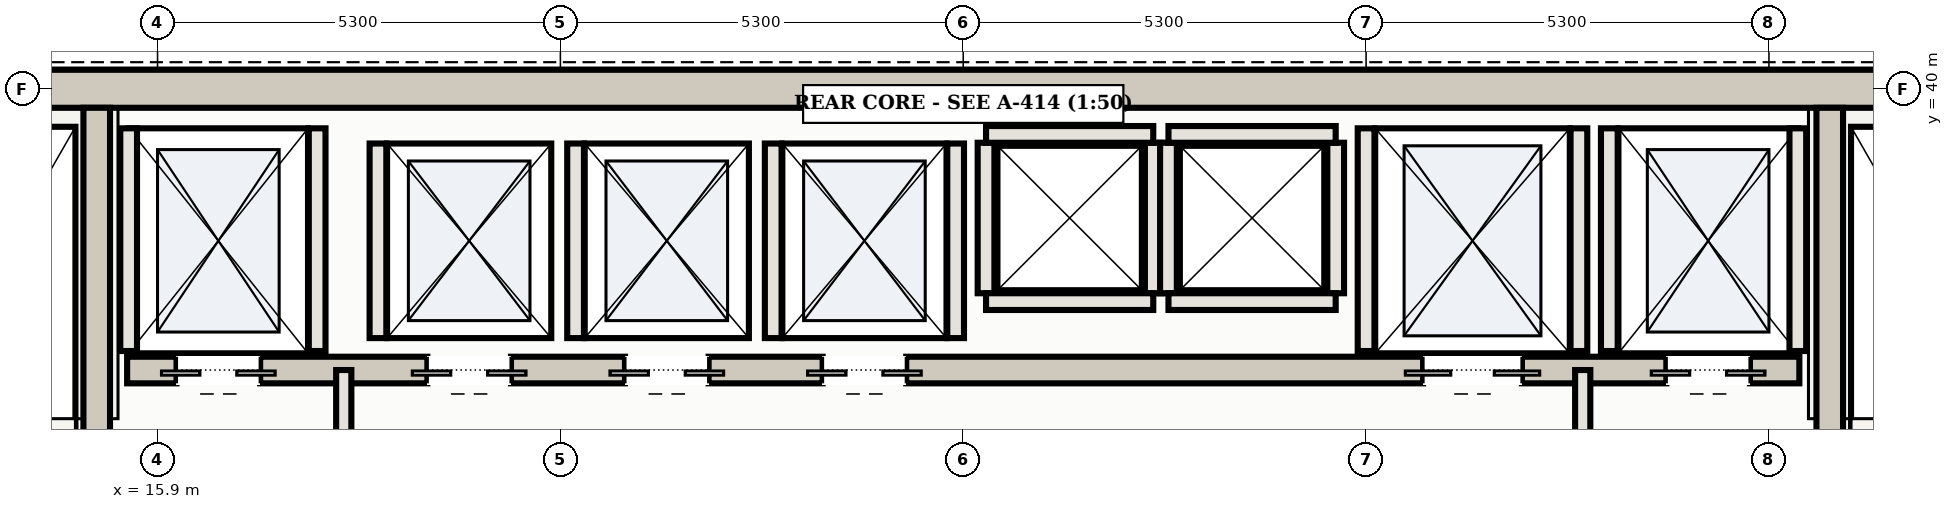
"""IFC4 building model, lengths in metres.
Left out: names, types, materials, properties, quantities, classifications, styles, units other than length and angle.
Written with IfcOpenShell. Run it as: python <this file> out.ifc"""

import sys

from ifc_helpers import new_model, si_unit, direction, frame, frame_2d, origin, place, context, subcontext, project, spatial, rectangle, extrude, element, fill, save


model = new_model("IFC4")
c1 = context("Model", 3, precision=1e-05, world=origin(), true_north=direction((0.0, 1.0)))
c2 = subcontext(c1, "Body", "Model", "MODEL_VIEW")
j1 = project(units=[si_unit("LENGTHUNIT", "METRE"), si_unit("PLANEANGLEUNIT", "RADIAN")], contexts=[c1])
p1 = place(None, origin())
s1 = spatial("IfcSite", under=j1, at=p1, CompositionType="ELEMENT")
p2 = place(p1, origin())
s2 = spatial("IfcBuilding", under=s1, at=p2, CompositionType="ELEMENT")
p3 = place(p2, frame((0.0, 0.0, 196.7)))
s3 = spatial("IfcBuildingStorey", under=s2, at=p3, CompositionType="ELEMENT", Elevation=196.7)
p4 = place(p3, frame((10.35, 40.0, 0.0), z_axis=(0.0, 0.0, 1.0), x_axis=(1.0, 0.0, 0.0)))
e1 = element("IfcWall", 1, at=p4, inside=s3, PredefinedType="SHEAR", context=c2, shape_type="SweptSolid", body=[
    extrude(rectangle(XDim=32.3, YDim=0.5, at=frame_2d((16.15, 0.0))), origin(), (0.0, 0.0, 1.0), 3.11),
])
p5 = place(p3, frame((15.1, 31.1, 0.0), z_axis=(0.0, 0.0, 1.0), x_axis=(0.0, 1.0, 0.0)))
e2 = element("IfcWall", 2, at=p5, inside=s3, PredefinedType="SHEAR", context=c2, shape_type="SweptSolid", body=[
    extrude(rectangle(XDim=8.65, YDim=0.35, at=frame_2d((4.325, 0.0))), origin(), (0.0, 0.0, 1.0), 3.11),
])
p6 = place(p5, frame((0.51, 0.0, 0.0)))
e3 = element("IfcOpeningElement", 3, at=p6, cuts=e2, PredefinedType="OPENING", context=c2, shape_type="SweptSolid", body=[
    extrude(rectangle(XDim=1.15, YDim=2.2, at=frame_2d((0.575, 1.1))), frame((0.0, 0.185, 0.0), z_axis=(0.0, -1.0, 0.0), x_axis=(1.0, 0.0, 0.0)), (0.0, 0.0, 1.0), 0.37),
])
p7 = place(p3, frame((37.9, 31.1, 0.0), z_axis=(0.0, 0.0, 1.0), x_axis=(0.0, 1.0, 0.0)))
e4 = element("IfcWall", 4, at=p7, inside=s3, PredefinedType="SHEAR", context=c2, shape_type="SweptSolid", body=[
    extrude(rectangle(XDim=8.65, YDim=0.35, at=frame_2d((4.325, 0.0))), origin(), (0.0, 0.0, 1.0), 3.11),
])
p8 = place(p7, frame((0.51, 0.0, 0.0)))
e5 = element("IfcOpeningElement", 5, at=p8, cuts=e4, PredefinedType="OPENING", context=c2, shape_type="SweptSolid", body=[
    extrude(rectangle(XDim=1.15, YDim=2.2, at=frame_2d((0.575, 1.1))), frame((0.0, 0.185, 0.0), z_axis=(0.0, -1.0, 0.0), x_axis=(1.0, 0.0, 0.0)), (0.0, 0.0, 1.0), 0.37),
])
p9 = place(p3, frame((15.5, 36.3, 0.0), z_axis=(0.0, 0.0, 1.0), x_axis=(1.0, 0.0, 0.0)))
e6 = element("IfcWall", 6, at=p9, inside=s3, PredefinedType="SHEAR", context=c2, shape_type="SweptSolid", body=[
    extrude(rectangle(XDim=22.0, YDim=0.35, at=frame_2d((11.0, 0.0))), origin(), (0.0, 0.0, 1.0), 3.11),
])
p10 = place(p9, frame((0.65, 0.0, 0.0)))
e7 = element("IfcOpeningElement", 7, at=p10, cuts=e6, PredefinedType="OPENING", context=c2, shape_type="SweptSolid", body=[
    extrude(rectangle(XDim=1.1, YDim=2.15, at=frame_2d((0.55, 1.075))), frame((0.0, 0.185, 0.0), z_axis=(0.0, -1.0, 0.0), x_axis=(1.0, 0.0, 0.0)), (0.0, 0.0, 1.0), 0.37),
])
p11 = place(p9, frame((20.25, 0.0, 0.0)))
e8 = element("IfcOpeningElement", 8, at=p11, cuts=e6, PredefinedType="OPENING", context=c2, shape_type="SweptSolid", body=[
    extrude(rectangle(XDim=1.1, YDim=2.15, at=frame_2d((0.55, 1.075))), frame((0.0, 0.185, 0.0), z_axis=(0.0, -1.0, 0.0), x_axis=(1.0, 0.0, 0.0)), (0.0, 0.0, 1.0), 0.37),
])
p12 = place(p9, frame((17.05, 0.0, 0.0)))
e9 = element("IfcOpeningElement", 9, at=p12, cuts=e6, PredefinedType="OPENING", context=c2, shape_type="SweptSolid", body=[
    extrude(rectangle(XDim=1.3, YDim=2.2, at=frame_2d((0.65, 1.1))), frame((0.0, 0.185, 0.0), z_axis=(0.0, -1.0, 0.0), x_axis=(1.0, 0.0, 0.0)), (0.0, 0.0, 1.0), 0.37),
])
p13 = place(p9, frame((3.95, 0.0, 0.0)))
e10 = element("IfcOpeningElement", 10, at=p13, cuts=e6, PredefinedType="OPENING", context=c2, shape_type="SweptSolid", body=[
    extrude(rectangle(XDim=1.1, YDim=2.15, at=frame_2d((0.55, 1.075))), frame((0.0, 0.185, 0.0), z_axis=(0.0, -1.0, 0.0), x_axis=(1.0, 0.0, 0.0)), (0.0, 0.0, 1.0), 0.37),
])
p14 = place(p9, frame((6.55, 0.0, 0.0)))
e11 = element("IfcOpeningElement", 11, at=p14, cuts=e6, PredefinedType="OPENING", context=c2, shape_type="SweptSolid", body=[
    extrude(rectangle(XDim=1.1, YDim=2.15, at=frame_2d((0.55, 1.075))), frame((0.0, 0.185, 0.0), z_axis=(0.0, -1.0, 0.0), x_axis=(1.0, 0.0, 0.0)), (0.0, 0.0, 1.0), 0.37),
])
p15 = place(p9, frame((9.15, 0.0, 0.0)))
e12 = element("IfcOpeningElement", 12, at=p15, cuts=e6, PredefinedType="OPENING", context=c2, shape_type="SweptSolid", body=[
    extrude(rectangle(XDim=1.1, YDim=2.15, at=frame_2d((0.55, 1.075))), frame((0.0, 0.185, 0.0), z_axis=(0.0, -1.0, 0.0), x_axis=(1.0, 0.0, 0.0)), (0.0, 0.0, 1.0), 0.37),
])
for number, where, z_axis, x_axis in (
    (13, (15.52, 36.55, 0.0), (0.0, 0.0, 1.0), (0.0, 1.0, 0.0)),
    (14, (18.0, 36.55, 0.0), (0.0, 0.0, 1.0), (0.0, 1.0, 0.0)),
    (15, (35.0, 36.55, 0.0), (0.0, 0.0, 1.0), (0.0, 1.0, 0.0)),
    (16, (37.48, 36.55, 0.0), (0.0, 0.0, 1.0), (0.0, 1.0, 0.0)),
    (17, (31.8, 36.55, 0.0), (0.0, 0.0, 1.0), (0.0, 1.0, 0.0)),
    (18, (34.6, 36.55, 0.0), (0.0, 0.0, 1.0), (0.0, 1.0, 0.0)),
):
    element("IfcWall", number, at=place(p3, frame(where, z_axis=z_axis, x_axis=x_axis)), inside=s3, PredefinedType="SOLIDWALL", context=c2, shape_type="SweptSolid", body=[
        extrude(rectangle(XDim=2.93, YDim=0.22, at=frame_2d((1.465, 0.0))), origin(), (0.0, 0.0, 1.0), 3.11),
    ])
for number, where, z_axis, x_axis in (
    (19, (18.8, 36.72, 0.0), (0.0, 0.0, 1.0), (0.0, 1.0, 0.0)),
    (20, (21.4, 36.72, 0.0), (0.0, 0.0, 1.0), (0.0, 1.0, 0.0)),
    (21, (24.0, 36.72, 0.0), (0.0, 0.0, 1.0), (0.0, 1.0, 0.0)),
    (22, (26.4, 36.72, 0.0), (0.0, 0.0, 1.0), (0.0, 1.0, 0.0)),
):
    element("IfcWall", number, at=place(p3, frame(where, z_axis=z_axis, x_axis=x_axis)), inside=s3, PredefinedType="SOLIDWALL", context=c2, shape_type="SweptSolid", body=[
        extrude(rectangle(XDim=2.56, YDim=0.22, at=frame_2d((1.28, 0.0))), origin(), (0.0, 0.0, 1.0), 3.11),
    ])
for number, where, z_axis, x_axis in (
    (23, (26.8, 37.31, 0.0), (0.0, 0.0, 1.0), (0.0, 1.0, 0.0)),
    (24, (29.0, 37.31, 0.0), (0.0, 0.0, 1.0), (0.0, 1.0, 0.0)),
):
    element("IfcWall", number, at=place(p3, frame(where, z_axis=z_axis, x_axis=x_axis)), inside=s3, PredefinedType="SOLIDWALL", context=c2, shape_type="SweptSolid", body=[
        extrude(rectangle(XDim=1.98, YDim=0.22, at=frame_2d((0.99, 0.0))), origin(), (0.0, 0.0, 1.0), 3.11),
    ])
for number, where, z_axis, x_axis in (
    (25, (26.8, 39.4, 0.0), (0.0, 0.0, 1.0), (1.0, 0.0, 0.0)),
    (26, (26.8, 37.2, 0.0), (0.0, 0.0, 1.0), (1.0, 0.0, 0.0)),
):
    element("IfcWall", number, at=place(p3, frame(where, z_axis=z_axis, x_axis=x_axis)), inside=s3, PredefinedType="SOLIDWALL", context=c2, shape_type="SweptSolid", body=[
        extrude(rectangle(XDim=2.2, YDim=0.22, at=frame_2d((1.1, 0.0))), origin(), (0.0, 0.0, 1.0), 3.11),
    ])
for number, where, z_axis, x_axis in (
    (27, (29.2, 37.31, 0.0), (0.0, 0.0, 1.0), (0.0, 1.0, 0.0)),
    (28, (31.4, 37.31, 0.0), (0.0, 0.0, 1.0), (0.0, 1.0, 0.0)),
):
    element("IfcWall", number, at=place(p3, frame(where, z_axis=z_axis, x_axis=x_axis)), inside=s3, PredefinedType="SOLIDWALL", context=c2, shape_type="SweptSolid", body=[
        extrude(rectangle(XDim=1.98, YDim=0.22, at=frame_2d((0.99, 0.0))), origin(), (0.0, 0.0, 1.0), 3.11),
    ])
for number, where, z_axis, x_axis in (
    (29, (29.2, 39.4, 0.0), (0.0, 0.0, 1.0), (1.0, 0.0, 0.0)),
    (30, (29.2, 37.2, 0.0), (0.0, 0.0, 1.0), (1.0, 0.0, 0.0)),
):
    element("IfcWall", number, at=place(p3, frame(where, z_axis=z_axis, x_axis=x_axis)), inside=s3, PredefinedType="SOLIDWALL", context=c2, shape_type="SweptSolid", body=[
        extrude(rectangle(XDim=2.2, YDim=0.22, at=frame_2d((1.1, 0.0))), origin(), (0.0, 0.0, 1.0), 3.11),
    ])
p16 = place(p3, frame((18.35, 31.15, 0.0), z_axis=(0.0, 0.0, 1.0), x_axis=(0.0, 1.0, 0.0)))
e31 = element("IfcWall", 31, at=p16, inside=s3, PredefinedType="PARTITIONING", context=c2, shape_type="SweptSolid", body=[
    extrude(rectangle(XDim=5.15, YDim=0.2, at=frame_2d((2.575, 0.0))), origin(), (0.0, 0.0, 1.0), 2.43),
])
p17 = place(p16, frame((1.875, 0.0, 0.0)))
e32 = element("IfcOpeningElement", 32, at=p17, cuts=e31, PredefinedType="OPENING", context=c2, shape_type="SweptSolid", body=[
    extrude(rectangle(XDim=1.25, YDim=2.2, at=frame_2d((0.625, 1.1))), frame((0.0, 0.11, 0.0), z_axis=(0.0, -1.0, 0.0), x_axis=(1.0, 0.0, 0.0)), (0.0, 0.0, 1.0), 0.22),
])
p18 = place(p3, frame((34.65, 31.15, 0.0), z_axis=(0.0, 0.0, 1.0), x_axis=(0.0, 1.0, 0.0)))
e33 = element("IfcWall", 33, at=p18, inside=s3, PredefinedType="PARTITIONING", context=c2, shape_type="SweptSolid", body=[
    extrude(rectangle(XDim=5.15, YDim=0.2, at=frame_2d((2.575, 0.0))), origin(), (0.0, 0.0, 1.0), 2.43),
])
p19 = place(p18, frame((1.875, 0.0, 0.0)))
e34 = element("IfcOpeningElement", 34, at=p19, cuts=e33, PredefinedType="OPENING", context=c2, shape_type="SweptSolid", body=[
    extrude(rectangle(XDim=1.25, YDim=2.2, at=frame_2d((0.625, 1.1))), frame((0.0, 0.11, 0.0), z_axis=(0.0, -1.0, 0.0), x_axis=(1.0, 0.0, 0.0)), (0.0, 0.0, 1.0), 0.22),
])
p20 = place(p10, frame((1.1, 0.0, 0.0), z_axis=(0.0, 0.0, 1.0), x_axis=(-1.0, 0.0, 0.0)))
e35 = element("IfcDoor", 35, at=p20, inside=s3, OperationType="DOUBLE_DOOR_SLIDING", PredefinedType="DOOR", context=c2, shape_type="SweptSolid", body=[
    extrude(rectangle(XDim=1.1, YDim=2.15, at=frame_2d((0.55, 1.075))), frame((0.0, 0.025, 0.0), z_axis=(0.0, -1.0, 0.0), x_axis=(1.0, 0.0, 0.0)), (0.0, 0.0, 1.0), 0.05),
])
fill(e7, e35)
p21 = place(p11, frame((1.1, 0.0, 0.0), z_axis=(0.0, 0.0, 1.0), x_axis=(-1.0, 0.0, 0.0)))
e36 = element("IfcDoor", 36, at=p21, inside=s3, OperationType="DOUBLE_DOOR_SLIDING", PredefinedType="DOOR", context=c2, shape_type="SweptSolid", body=[
    extrude(rectangle(XDim=1.1, YDim=2.15, at=frame_2d((0.55, 1.075))), frame((0.0, 0.025, 0.0), z_axis=(0.0, -1.0, 0.0), x_axis=(1.0, 0.0, 0.0)), (0.0, 0.0, 1.0), 0.05),
])
fill(e8, e36)
p22 = place(p12, frame((1.3, 0.0, 0.0), z_axis=(0.0, 0.0, 1.0), x_axis=(-1.0, 0.0, 0.0)))
e37 = element("IfcDoor", 37, at=p22, inside=s3, OperationType="DOUBLE_DOOR_SLIDING", PredefinedType="DOOR", context=c2, shape_type="SweptSolid", body=[
    extrude(rectangle(XDim=1.3, YDim=2.2, at=frame_2d((0.65, 1.1))), frame((0.0, 0.025, 0.0), z_axis=(0.0, -1.0, 0.0), x_axis=(1.0, 0.0, 0.0)), (0.0, 0.0, 1.0), 0.05),
])
fill(e9, e37)
p23 = place(p13, frame((1.1, 0.0, 0.0), z_axis=(0.0, 0.0, 1.0), x_axis=(-1.0, 0.0, 0.0)))
e38 = element("IfcDoor", 38, at=p23, inside=s3, OperationType="DOUBLE_DOOR_SLIDING", PredefinedType="DOOR", context=c2, shape_type="SweptSolid", body=[
    extrude(rectangle(XDim=1.1, YDim=2.15, at=frame_2d((0.55, 1.075))), frame((0.0, 0.025, 0.0), z_axis=(0.0, -1.0, 0.0), x_axis=(1.0, 0.0, 0.0)), (0.0, 0.0, 1.0), 0.05),
])
fill(e10, e38)
p24 = place(p14, frame((1.1, 0.0, 0.0), z_axis=(0.0, 0.0, 1.0), x_axis=(-1.0, 0.0, 0.0)))
e39 = element("IfcDoor", 39, at=p24, inside=s3, OperationType="DOUBLE_DOOR_SLIDING", PredefinedType="DOOR", context=c2, shape_type="SweptSolid", body=[
    extrude(rectangle(XDim=1.1, YDim=2.15, at=frame_2d((0.55, 1.075))), frame((0.0, 0.025, 0.0), z_axis=(0.0, -1.0, 0.0), x_axis=(1.0, 0.0, 0.0)), (0.0, 0.0, 1.0), 0.05),
])
fill(e11, e39)
p25 = place(p15, frame((1.1, 0.0, 0.0), z_axis=(0.0, 0.0, 1.0), x_axis=(-1.0, 0.0, 0.0)))
e40 = element("IfcDoor", 40, at=p25, inside=s3, OperationType="DOUBLE_DOOR_SLIDING", PredefinedType="DOOR", context=c2, shape_type="SweptSolid", body=[
    extrude(rectangle(XDim=1.1, YDim=2.15, at=frame_2d((0.55, 1.075))), frame((0.0, 0.025, 0.0), z_axis=(0.0, -1.0, 0.0), x_axis=(1.0, 0.0, 0.0)), (0.0, 0.0, 1.0), 0.05),
])
fill(e12, e40)
save(model, sys.argv[1])
